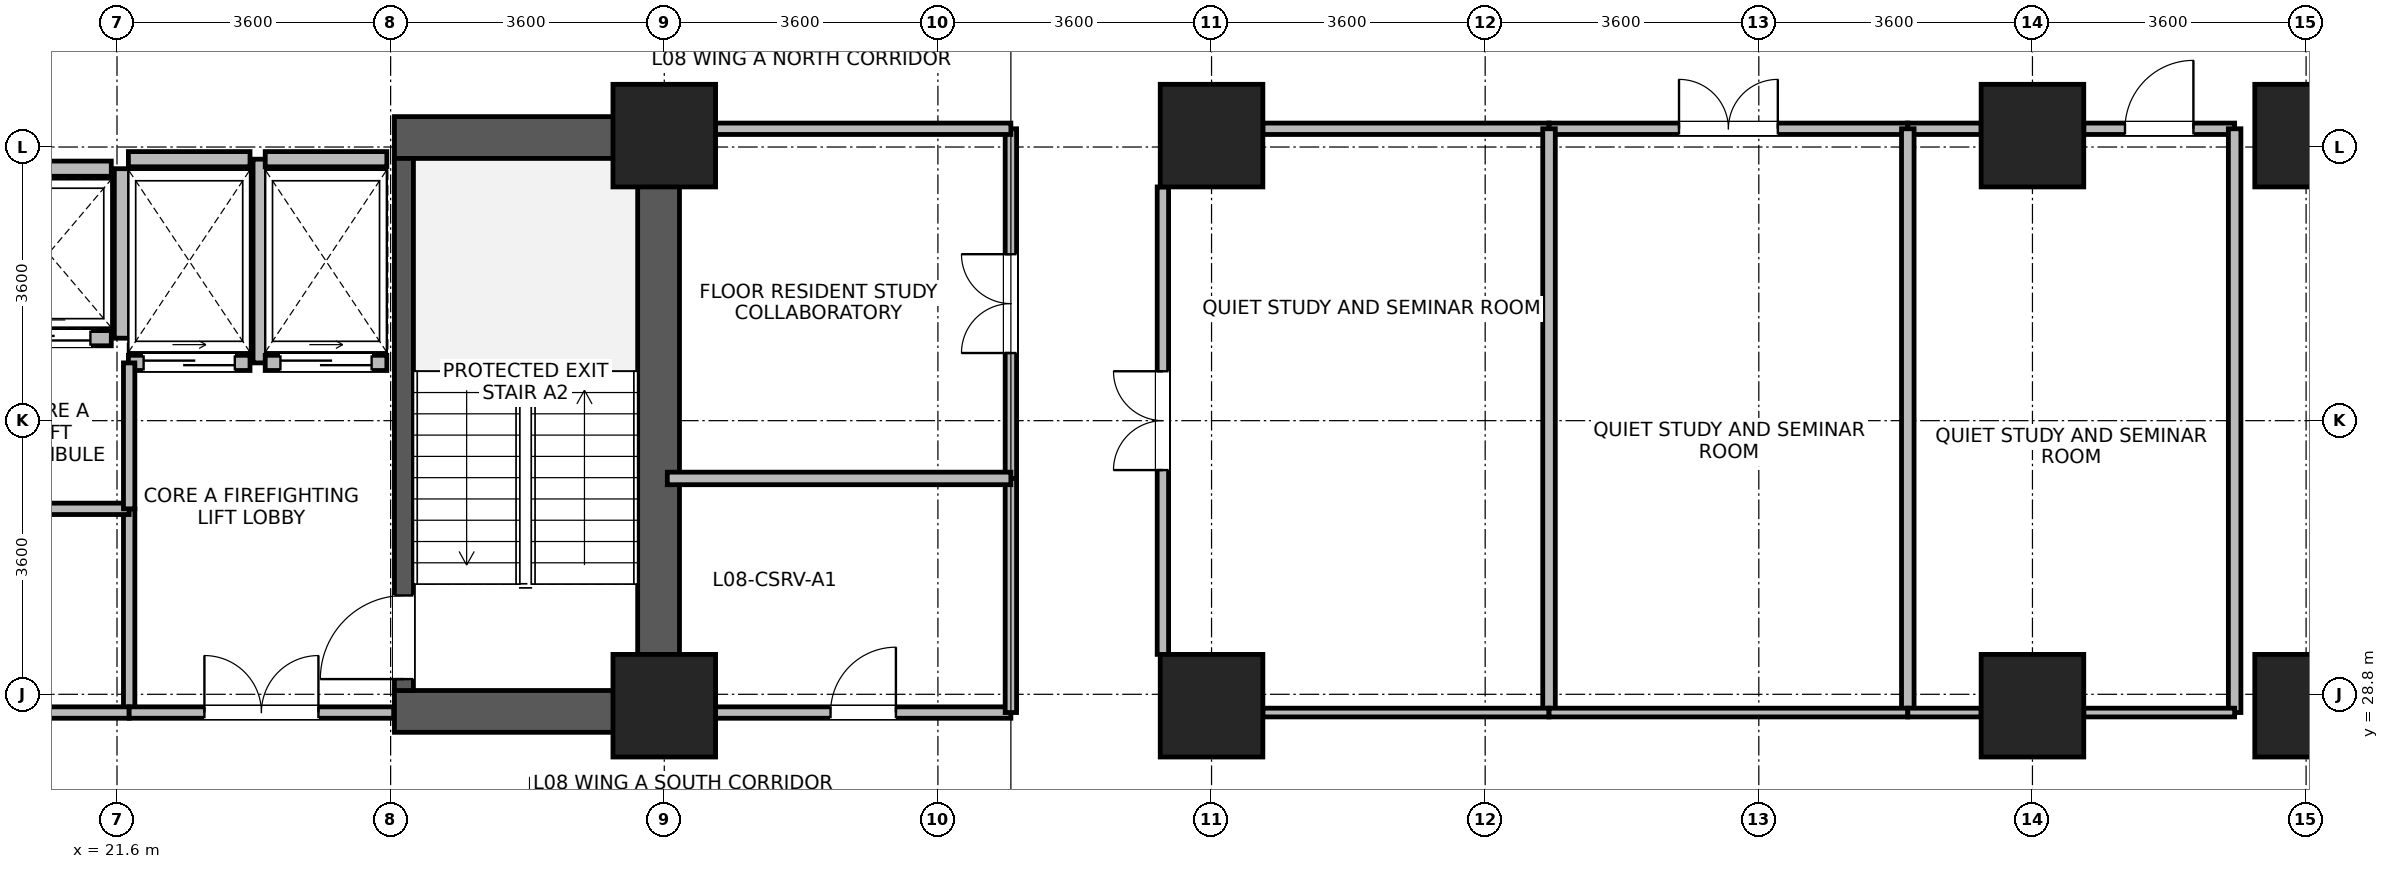
"""IFC4 building model, lengths in metres.
Left out: names, types, materials, properties, quantities, classifications, styles, units other than length and angle.
Written with IfcOpenShell. Run it as: python <this file> out.ifc"""

import sys

from ifc_helpers import new_model, si_unit, direction, frame, frame_2d, origin, origin_2d, place, context, subcontext, project, spatial, rectangle, extrude, source, transform, mapped, element, fill, save


model = new_model("IFC4")
c1 = context("Model", 3, precision=1e-05, world=origin(), true_north=direction((0.0, 1.0)))
c2 = subcontext(c1, "Body", "Model", "MODEL_VIEW")
j1 = project(units=[si_unit("LENGTHUNIT", "METRE"), si_unit("PLANEANGLEUNIT", "RADIAN")], contexts=[c1])
p1 = place(None, origin())
s1 = spatial("IfcSite", under=j1, at=p1, CompositionType="ELEMENT")
p2 = place(p1, origin())
s2 = spatial("IfcBuilding", under=s1, at=p2, CompositionType="ELEMENT")
p3 = place(p2, frame((0.0, 0.0, 36.4)))
s3 = spatial("IfcBuildingStorey", under=s2, at=p3, CompositionType="ELEMENT", Elevation=36.4)
p4 = place(p3, frame((28.725, 28.3, 0.0), z_axis=(0.0, 0.0, 1.0), x_axis=(0.0, 1.0, 0.0)))
e1 = element("IfcWall", 1, at=p4, inside=s3, PredefinedType="SHEAR", context=c2, shape_type="SweptSolid", body=[
    extrude(rectangle(XDim=8.1, YDim=0.55, at=frame_2d((4.05, 0.0))), origin(), (0.0, 0.0, 1.0), 3.45),
])
for number, where, z_axis, x_axis in (
    (2, (25.25, 28.575, 0.0), (0.0, 0.0, 1.0), (1.0, 0.0, 0.0)),
    (3, (25.25, 36.125, 0.0), (0.0, 0.0, 1.0), (1.0, 0.0, 0.0)),
):
    element("IfcWall", number, at=place(p3, frame(where, z_axis=z_axis, x_axis=x_axis)), inside=s3, PredefinedType="SHEAR", context=c2, shape_type="SweptSolid", body=[
        extrude(rectangle(XDim=3.2, YDim=0.55, at=frame_2d((1.6, 0.0))), origin(), (0.0, 0.0, 1.0), 3.45),
    ])
p5 = place(p3, frame((25.375, 28.85, 0.0), z_axis=(0.0, 0.0, 1.0), x_axis=(0.0, 1.0, 0.0)))
e4 = element("IfcWall", 4, at=p5, inside=s3, PredefinedType="SHEAR", context=c2, shape_type="SweptSolid", body=[
    extrude(rectangle(XDim=7.0, YDim=0.25, at=frame_2d((3.5, 0.0))), origin(), (0.0, 0.0, 1.0), 3.45),
])
p6 = place(p5, frame((0.15, 0.0, 0.0)))
e5 = element("IfcOpeningElement", 5, at=p6, cuts=e4, PredefinedType="OPENING", context=c2, shape_type="SweptSolid", body=[
    extrude(rectangle(XDim=1.1, YDim=2.08, at=frame_2d((0.55, 1.04))), frame((0.0, 0.135, 0.0), z_axis=(0.0, -1.0, 0.0), x_axis=(1.0, 0.0, 0.0)), (0.0, 0.0, 1.0), 0.27),
])
m1 = source(origin(), c2, "Body", "SweptSolid", [
    extrude(rectangle(XDim=1.35, YDim=1.35, at=origin_2d()), origin(), (0.0, 0.0, 1.0), 3.7),
])
for number, where, z_axis, x_axis in (
    (6, (28.8, 28.65, 0.0), (0.0, 0.0, 1.0), (1.0, 0.0, 0.0)),
    (7, (28.8, 36.15, 0.0), (0.0, 0.0, 1.0), (1.0, 0.0, 0.0)),
    (8, (36.0, 28.65, 0.0), (0.0, 0.0, 1.0), (1.0, 0.0, 0.0)),
    (9, (36.0, 36.15, 0.0), (0.0, 0.0, 1.0), (1.0, 0.0, 0.0)),
    (10, (46.8, 28.65, 0.0), (0.0, 0.0, 1.0), (1.0, 0.0, 0.0)),
    (11, (46.8, 36.15, 0.0), (0.0, 0.0, 1.0), (1.0, 0.0, 0.0)),
    (12, (50.4, 28.65, 0.0), (0.0, 0.0, 1.0), (1.0, 0.0, 0.0)),
    (13, (50.4, 36.15, 0.0), (0.0, 0.0, 1.0), (1.0, 0.0, 0.0)),
):
    element("IfcColumn", number, at=place(p3, frame(where, z_axis=z_axis, x_axis=x_axis)), inside=s3, PredefinedType="COLUMN", context=c2, shape_type="MappedRepresentation", body=[
        mapped(m1, transform((0.0, 0.0, 0.0), x_axis=(1.0, 0.0, 0.0), y_axis=(0.0, 1.0, 0.0), z_axis=(0.0, 0.0, 1.0), scale=1.0)),
    ])
p7 = place(p3, frame((19.875, 33.485, 0.0), z_axis=(0.0, 0.0, 1.0), x_axis=(1.0, 0.0, 0.0)))
e14 = element("IfcWall", 14, at=p7, inside=s3, PredefinedType="PARTITIONING", context=c2, shape_type="SweptSolid", body=[
    extrude(rectangle(XDim=1.65, YDim=0.2, at=frame_2d((0.825, 0.0))), origin(), (0.0, 0.0, 1.0), 3.43),
])
p8 = place(p7, frame((0.275, 0.0, 0.0)))
e15 = element("IfcOpeningElement", 15, at=p8, cuts=e14, PredefinedType="OPENING", context=c2, shape_type="SweptSolid", body=[
    extrude(rectangle(XDim=1.1, YDim=2.12, at=frame_2d((0.55, 1.06))), frame((0.0, 0.11, 0.0), z_axis=(0.0, -1.0, 0.0), x_axis=(1.0, 0.0, 0.0)), (0.0, 0.0, 1.0), 0.22),
])
p9 = place(p3, frame((19.875, 35.715, 0.0), z_axis=(0.0, 0.0, 1.0), x_axis=(1.0, 0.0, 0.0)))
e16 = element("IfcWall", 16, at=p9, inside=s3, PredefinedType="PARTITIONING", context=c2, shape_type="SweptSolid", body=[
    extrude(rectangle(XDim=1.65, YDim=0.2, at=frame_2d((0.825, 0.0))), origin(), (0.0, 0.0, 1.0), 2.23),
])
p10 = place(p3, frame((21.665, 33.485, 0.0), z_axis=(0.0, 0.0, 1.0), x_axis=(0.0, 1.0, 0.0)))
e17 = element("IfcWall", 17, at=p10, inside=s3, PredefinedType="PARTITIONING", context=c2, shape_type="SweptSolid", body=[
    extrude(rectangle(XDim=2.23, YDim=0.2, at=frame_2d((1.115, 0.0))), origin(), (0.0, 0.0, 1.0), 3.43),
])
p11 = place(p3, frame((21.75, 33.16, 0.0), z_axis=(0.0, 0.0, 1.0), x_axis=(1.0, 0.0, 0.0)))
e18 = element("IfcWall", 18, at=p11, inside=s3, PredefinedType="PARTITIONING", context=c2, shape_type="SweptSolid", body=[
    extrude(rectangle(XDim=1.6, YDim=0.2, at=frame_2d((0.8, 0.0))), origin(), (0.0, 0.0, 1.0), 3.43),
])
p12 = place(p11, frame((0.2, 0.0, 0.0)))
e19 = element("IfcOpeningElement", 19, at=p12, cuts=e18, PredefinedType="OPENING", context=c2, shape_type="SweptSolid", body=[
    extrude(rectangle(XDim=1.2, YDim=2.12, at=frame_2d((0.6, 1.06))), frame((0.0, 0.11, 0.0), z_axis=(0.0, -1.0, 0.0), x_axis=(1.0, 0.0, 0.0)), (0.0, 0.0, 1.0), 0.22),
])
p13 = place(p3, frame((21.75, 35.84, 0.0), z_axis=(0.0, 0.0, 1.0), x_axis=(1.0, 0.0, 0.0)))
e20 = element("IfcWall", 20, at=p13, inside=s3, PredefinedType="PARTITIONING", context=c2, shape_type="SweptSolid", body=[
    extrude(rectangle(XDim=1.6, YDim=0.2, at=frame_2d((0.8, 0.0))), origin(), (0.0, 0.0, 1.0), 2.23),
])
p14 = place(p3, frame((23.49, 33.16, 0.0), z_axis=(0.0, 0.0, 1.0), x_axis=(0.0, 1.0, 0.0)))
e21 = element("IfcWall", 21, at=p14, inside=s3, PredefinedType="PARTITIONING", context=c2, shape_type="SweptSolid", body=[
    extrude(rectangle(XDim=2.68, YDim=0.2, at=frame_2d((1.34, 0.0))), origin(), (0.0, 0.0, 1.0), 3.43),
])
p15 = place(p3, frame((23.55, 33.16, 0.0), z_axis=(0.0, 0.0, 1.0), x_axis=(1.0, 0.0, 0.0)))
e22 = element("IfcWall", 22, at=p15, inside=s3, PredefinedType="PARTITIONING", context=c2, shape_type="SweptSolid", body=[
    extrude(rectangle(XDim=1.6, YDim=0.2, at=frame_2d((0.8, 0.0))), origin(), (0.0, 0.0, 1.0), 3.43),
])
p16 = place(p15, frame((0.2, 0.0, 0.0)))
e23 = element("IfcOpeningElement", 23, at=p16, cuts=e22, PredefinedType="OPENING", context=c2, shape_type="SweptSolid", body=[
    extrude(rectangle(XDim=1.2, YDim=2.12, at=frame_2d((0.6, 1.06))), frame((0.0, 0.11, 0.0), z_axis=(0.0, -1.0, 0.0), x_axis=(1.0, 0.0, 0.0)), (0.0, 0.0, 1.0), 0.22),
])
p17 = place(p3, frame((23.55, 35.84, 0.0), z_axis=(0.0, 0.0, 1.0), x_axis=(1.0, 0.0, 0.0)))
e24 = element("IfcWall", 24, at=p17, inside=s3, PredefinedType="PARTITIONING", context=c2, shape_type="SweptSolid", body=[
    extrude(rectangle(XDim=1.6, YDim=0.2, at=frame_2d((0.8, 0.0))), origin(), (0.0, 0.0, 1.0), 2.23),
])
p18 = place(p3, frame((35.36, 29.325, 0.0), z_axis=(0.0, 0.0, 1.0), x_axis=(0.0, 1.0, 0.0)))
e25 = element("IfcWall", 25, at=p18, inside=s3, PredefinedType="PARTITIONING", context=c2, shape_type="SweptSolid", body=[
    extrude(rectangle(XDim=6.15, YDim=0.15, at=frame_2d((3.075, 0.0))), origin(), (0.0, 0.0, 1.0), 3.43),
])
p19 = place(p18, frame((2.425, 0.0, 0.0)))
e26 = element("IfcOpeningElement", 26, at=p19, cuts=e25, PredefinedType="OPENING", context=c2, shape_type="SweptSolid", body=[
    extrude(rectangle(XDim=1.3, YDim=2.12, at=frame_2d((0.65, 1.06))), frame((0.0, 0.085, 0.0), z_axis=(0.0, -1.0, 0.0), x_axis=(1.0, 0.0, 0.0)), (0.0, 0.0, 1.0), 0.17),
])
p20 = place(p3, frame((36.675, 36.24, 0.0), z_axis=(0.0, 0.0, 1.0), x_axis=(1.0, 0.0, 0.0)))
e27 = element("IfcWall", 27, at=p20, inside=s3, PredefinedType="PARTITIONING", context=c2, shape_type="SweptSolid", body=[
    extrude(rectangle(XDim=3.765, YDim=0.15, at=frame_2d((1.882, 0.0))), origin(), (0.0, 0.0, 1.0), 2.78),
])
p21 = place(p3, frame((40.44, 36.24, 0.0), z_axis=(0.0, 0.0, 1.0), x_axis=(1.0, 0.0, 0.0)))
e28 = element("IfcWall", 28, at=p21, inside=s3, PredefinedType="PARTITIONING", context=c2, shape_type="SweptSolid", body=[
    extrude(rectangle(XDim=4.72, YDim=0.15, at=frame_2d((2.36, 0.0))), origin(), (0.0, 0.0, 1.0), 2.78),
])
p22 = place(p21, frame((1.71, 0.0, 0.0)))
e29 = element("IfcOpeningElement", 29, at=p22, cuts=e28, PredefinedType="OPENING", context=c2, shape_type="SweptSolid", body=[
    extrude(rectangle(XDim=1.3, YDim=2.12, at=frame_2d((0.65, 1.06))), frame((0.0, 0.085, 0.0), z_axis=(0.0, -1.0, 0.0), x_axis=(1.0, 0.0, 0.0)), (0.0, 0.0, 1.0), 0.17),
])
p23 = place(p3, frame((33.36, 31.64, 0.0), z_axis=(0.0, 0.0, 1.0), x_axis=(0.0, 1.0, 0.0)))
e30 = element("IfcWall", 30, at=p23, inside=s3, PredefinedType="PARTITIONING", context=c2, shape_type="SweptSolid", body=[
    extrude(rectangle(XDim=4.6, YDim=0.15, at=frame_2d((2.3, 0.0))), origin(), (0.0, 0.0, 1.0), 3.43),
])
p24 = place(p23, frame((1.65, 0.0, 0.0)))
e31 = element("IfcOpeningElement", 31, at=p24, cuts=e30, PredefinedType="OPENING", context=c2, shape_type="SweptSolid", body=[
    extrude(rectangle(XDim=1.3, YDim=2.12, at=frame_2d((0.65, 1.06))), frame((0.0, 0.085, 0.0), z_axis=(0.0, -1.0, 0.0), x_axis=(1.0, 0.0, 0.0)), (0.0, 0.0, 1.0), 0.17),
])
p25 = place(p3, frame((29.475, 28.56, 0.0), z_axis=(0.0, 0.0, 1.0), x_axis=(1.0, 0.0, 0.0)))
e32 = element("IfcWall", 32, at=p25, inside=s3, PredefinedType="PARTITIONING", context=c2, shape_type="SweptSolid", body=[
    extrude(rectangle(XDim=3.885, YDim=0.15, at=frame_2d((1.942, 0.0))), origin(), (0.0, 0.0, 1.0), 2.78),
])
p26 = place(p25, frame((1.512, 0.0, 0.0)))
e33 = element("IfcOpeningElement", 33, at=p26, cuts=e32, PredefinedType="OPENING", context=c2, shape_type="SweptSolid", body=[
    extrude(rectangle(XDim=0.86, YDim=2.02, at=frame_2d((0.43, 1.01))), frame((0.0, 0.085, 0.0), z_axis=(0.0, -1.0, 0.0), x_axis=(1.0, 0.0, 0.0)), (0.0, 0.0, 1.0), 0.17),
])
p27 = place(p3, frame((29.475, 36.24, 0.0), z_axis=(0.0, 0.0, 1.0), x_axis=(1.0, 0.0, 0.0)))
e34 = element("IfcWall", 34, at=p27, inside=s3, PredefinedType="PARTITIONING", context=c2, shape_type="SweptSolid", body=[
    extrude(rectangle(XDim=3.885, YDim=0.15, at=frame_2d((1.942, 0.0))), origin(), (0.0, 0.0, 1.0), 2.78),
])
p28 = place(p3, frame((45.16, 36.24, 0.0), z_axis=(0.0, 0.0, 1.0), x_axis=(1.0, 0.0, 0.0)))
e35 = element("IfcWall", 35, at=p28, inside=s3, PredefinedType="PARTITIONING", context=c2, shape_type="SweptSolid", body=[
    extrude(rectangle(XDim=0.965, YDim=0.15, at=frame_2d((0.482, 0.0))), origin(), (0.0, 0.0, 1.0), 2.78),
])
p29 = place(p3, frame((47.475, 36.24, 0.0), z_axis=(0.0, 0.0, 1.0), x_axis=(1.0, 0.0, 0.0)))
e36 = element("IfcWall", 36, at=p29, inside=s3, PredefinedType="PARTITIONING", context=c2, shape_type="SweptSolid", body=[
    extrude(rectangle(XDim=1.985, YDim=0.15, at=frame_2d((0.992, 0.0))), origin(), (0.0, 0.0, 1.0), 2.78),
])
p30 = place(p29, frame((0.542, 0.0, 0.0)))
e37 = element("IfcOpeningElement", 37, at=p30, cuts=e36, PredefinedType="OPENING", context=c2, shape_type="SweptSolid", body=[
    extrude(rectangle(XDim=0.9, YDim=2.08, at=frame_2d((0.45, 1.04))), frame((0.0, 0.085, 0.0), z_axis=(0.0, -1.0, 0.0), x_axis=(1.0, 0.0, 0.0)), (0.0, 0.0, 1.0), 0.17),
])
p31 = place(p3, frame((33.36, 28.56, 0.0), z_axis=(0.0, 0.0, 1.0), x_axis=(0.0, 1.0, 0.0)))
e38 = element("IfcWall", 38, at=p31, inside=s3, PredefinedType="PARTITIONING", context=c2, shape_type="SweptSolid", body=[
    extrude(rectangle(XDim=3.08, YDim=0.15, at=frame_2d((1.54, 0.0))), origin(), (0.0, 0.0, 1.0), 3.43),
])
p32 = place(p3, frame((21.76, 28.56, 0.0), z_axis=(0.0, 0.0, 1.0), x_axis=(0.0, 1.0, 0.0)))
e39 = element("IfcWall", 39, at=p32, inside=s3, PredefinedType="PARTITIONING", context=c2, shape_type="SweptSolid", body=[
    extrude(rectangle(XDim=2.68, YDim=0.15, at=frame_2d((1.34, 0.0))), origin(), (0.0, 0.0, 1.0), 3.43),
])
p33 = place(p3, frame((19.76, 28.56, 0.0), z_axis=(0.0, 0.0, 1.0), x_axis=(1.0, 0.0, 0.0)))
e40 = element("IfcWall", 40, at=p33, inside=s3, PredefinedType="PARTITIONING", context=c2, shape_type="SweptSolid", body=[
    extrude(rectangle(XDim=2.0, YDim=0.15, at=frame_2d((1.0, 0.0))), origin(), (0.0, 0.0, 1.0), 2.23),
])
p34 = place(p3, frame((19.76, 31.24, 0.0), z_axis=(0.0, 0.0, 1.0), x_axis=(1.0, 0.0, 0.0)))
e41 = element("IfcWall", 41, at=p34, inside=s3, PredefinedType="PARTITIONING", context=c2, shape_type="SweptSolid", body=[
    extrude(rectangle(XDim=2.0, YDim=0.15, at=frame_2d((1.0, 0.0))), origin(), (0.0, 0.0, 1.0), 3.43),
])
for number, where, z_axis, x_axis in (
    (42, (40.44, 28.56, 0.0), (0.0, 0.0, 1.0), (0.0, 1.0, 0.0)),
    (43, (45.16, 28.56, 0.0), (0.0, 0.0, 1.0), (0.0, 1.0, 0.0)),
    (44, (49.46, 28.56, 0.0), (0.0, 0.0, 1.0), (0.0, 1.0, 0.0)),
):
    element("IfcWall", number, at=place(p3, frame(where, z_axis=z_axis, x_axis=x_axis)), inside=s3, PredefinedType="PARTITIONING", context=c2, shape_type="SweptSolid", body=[
        extrude(rectangle(XDim=7.68, YDim=0.165, at=frame_2d((3.84, 0.0))), origin(), (0.0, 0.0, 1.0), 3.43),
    ])
p35 = place(p3, frame((36.675, 28.56, 0.0), z_axis=(0.0, 0.0, 1.0), x_axis=(1.0, 0.0, 0.0)))
e45 = element("IfcWall", 45, at=p35, inside=s3, PredefinedType="PARTITIONING", context=c2, shape_type="SweptSolid", body=[
    extrude(rectangle(XDim=3.765, YDim=0.115, at=frame_2d((1.882, 0.0))), origin(), (0.0, 0.0, 1.0), 2.78),
])
p36 = place(p3, frame((40.44, 28.56, 0.0), z_axis=(0.0, 0.0, 1.0), x_axis=(1.0, 0.0, 0.0)))
e46 = element("IfcWall", 46, at=p36, inside=s3, PredefinedType="PARTITIONING", context=c2, shape_type="SweptSolid", body=[
    extrude(rectangle(XDim=4.72, YDim=0.115, at=frame_2d((2.36, 0.0))), origin(), (0.0, 0.0, 1.0), 2.78),
])
p37 = place(p3, frame((28.84, 31.64, 0.0), z_axis=(0.0, 0.0, 1.0), x_axis=(1.0, 0.0, 0.0)))
e47 = element("IfcWall", 47, at=p37, inside=s3, PredefinedType="PARTITIONING", context=c2, shape_type="SweptSolid", body=[
    extrude(rectangle(XDim=4.52, YDim=0.165, at=frame_2d((2.26, 0.0))), origin(), (0.0, 0.0, 1.0), 3.43),
])
p38 = place(p3, frame((45.16, 28.56, 0.0), z_axis=(0.0, 0.0, 1.0), x_axis=(1.0, 0.0, 0.0)))
e48 = element("IfcWall", 48, at=p38, inside=s3, PredefinedType="PARTITIONING", context=c2, shape_type="SweptSolid", body=[
    extrude(rectangle(XDim=0.965, YDim=0.115, at=frame_2d((0.482, 0.0))), origin(), (0.0, 0.0, 1.0), 2.78),
])
p39 = place(p3, frame((47.475, 28.56, 0.0), z_axis=(0.0, 0.0, 1.0), x_axis=(1.0, 0.0, 0.0)))
e49 = element("IfcWall", 49, at=p39, inside=s3, PredefinedType="PARTITIONING", context=c2, shape_type="SweptSolid", body=[
    extrude(rectangle(XDim=1.985, YDim=0.115, at=frame_2d((0.992, 0.0))), origin(), (0.0, 0.0, 1.0), 2.78),
])
p40 = place(p3, frame((21.76, 28.56, 0.0), z_axis=(0.0, 0.0, 1.0), x_axis=(1.0, 0.0, 0.0)))
e50 = element("IfcWall", 50, at=p40, inside=s3, PredefinedType="PARTITIONING", context=c2, shape_type="SweptSolid", body=[
    extrude(rectangle(XDim=3.48, YDim=0.15, at=frame_2d((1.74, 0.0))), origin(), (0.0, 0.0, 1.0), 2.23),
])
p41 = place(p40, frame((0.99, 0.0, 0.0)))
e51 = element("IfcOpeningElement", 51, at=p41, cuts=e50, PredefinedType="OPENING", context=c2, shape_type="SweptSolid", body=[
    extrude(rectangle(XDim=1.5, YDim=2.1, at=frame_2d((0.75, 1.05))), frame((0.0, 0.085, 0.0), z_axis=(0.0, -1.0, 0.0), x_axis=(1.0, 0.0, 0.0)), (0.0, 0.0, 1.0), 0.17),
])
p42 = place(p3, frame((21.76, 31.24, 0.0), z_axis=(0.0, 0.0, 1.0), x_axis=(0.0, 1.0, 0.0)))
e52 = element("IfcWall", 52, at=p42, inside=s3, PredefinedType="PARTITIONING", context=c2, shape_type="SweptSolid", body=[
    extrude(rectangle(XDim=1.92, YDim=0.15, at=frame_2d((0.96, 0.0))), origin(), (0.0, 0.0, 1.0), 3.43),
])
p43 = place(p6, origin())
e53 = element("IfcDoor", 53, at=p43, inside=s3, OperationType="SINGLE_SWING_LEFT", PredefinedType="DOOR", context=c2, shape_type="SweptSolid", body=[
    extrude(rectangle(XDim=1.1, YDim=2.08, at=frame_2d((0.55, 1.04))), frame((0.0, 0.025, 0.0), z_axis=(0.0, -1.0, 0.0), x_axis=(1.0, 0.0, 0.0)), (0.0, 0.0, 1.0), 0.05),
])
fill(e5, e53)
p44 = place(p8, origin())
e54 = element("IfcDoor", 54, at=p44, inside=s3, OperationType="SLIDING_TO_LEFT", PredefinedType="DOOR", context=c2, shape_type="SweptSolid", body=[
    extrude(rectangle(XDim=1.1, YDim=2.12, at=frame_2d((0.55, 1.06))), frame((0.0, 0.025, 0.0), z_axis=(0.0, -1.0, 0.0), x_axis=(1.0, 0.0, 0.0)), (0.0, 0.0, 1.0), 0.05),
])
fill(e15, e54)
p45 = place(p12, origin())
e55 = element("IfcDoor", 55, at=p45, inside=s3, OperationType="SLIDING_TO_RIGHT", PredefinedType="DOOR", context=c2, shape_type="SweptSolid", body=[
    extrude(rectangle(XDim=1.2, YDim=2.12, at=frame_2d((0.6, 1.06))), frame((0.0, 0.025, 0.0), z_axis=(0.0, -1.0, 0.0), x_axis=(1.0, 0.0, 0.0)), (0.0, 0.0, 1.0), 0.05),
])
fill(e19, e55)
p46 = place(p16, origin())
e56 = element("IfcDoor", 56, at=p46, inside=s3, OperationType="SLIDING_TO_RIGHT", PredefinedType="DOOR", context=c2, shape_type="SweptSolid", body=[
    extrude(rectangle(XDim=1.2, YDim=2.12, at=frame_2d((0.6, 1.06))), frame((0.0, 0.025, 0.0), z_axis=(0.0, -1.0, 0.0), x_axis=(1.0, 0.0, 0.0)), (0.0, 0.0, 1.0), 0.05),
])
fill(e23, e56)
p47 = place(p19, origin())
e57 = element("IfcDoor", 57, at=p47, inside=s3, OperationType="DOUBLE_DOOR_SINGLE_SWING", PredefinedType="DOOR", context=c2, shape_type="SweptSolid", body=[
    extrude(rectangle(XDim=1.3, YDim=2.12, at=frame_2d((0.65, 1.06))), frame((0.0, 0.025, 0.0), z_axis=(0.0, -1.0, 0.0), x_axis=(1.0, 0.0, 0.0)), (0.0, 0.0, 1.0), 0.05),
])
fill(e26, e57)
p48 = place(p22, origin())
e58 = element("IfcDoor", 58, at=p48, inside=s3, OperationType="DOUBLE_DOOR_SINGLE_SWING", PredefinedType="DOOR", context=c2, shape_type="SweptSolid", body=[
    extrude(rectangle(XDim=1.3, YDim=2.12, at=frame_2d((0.65, 1.06))), frame((0.0, 0.025, 0.0), z_axis=(0.0, -1.0, 0.0), x_axis=(1.0, 0.0, 0.0)), (0.0, 0.0, 1.0), 0.05),
])
fill(e29, e58)
p49 = place(p24, origin())
e59 = element("IfcDoor", 59, at=p49, inside=s3, OperationType="DOUBLE_DOOR_SINGLE_SWING", PredefinedType="DOOR", context=c2, shape_type="SweptSolid", body=[
    extrude(rectangle(XDim=1.3, YDim=2.12, at=frame_2d((0.65, 1.06))), frame((0.0, 0.025, 0.0), z_axis=(0.0, -1.0, 0.0), x_axis=(1.0, 0.0, 0.0)), (0.0, 0.0, 1.0), 0.05),
])
fill(e31, e59)
p50 = place(p26, origin())
e60 = element("IfcDoor", 60, at=p50, inside=s3, OperationType="SINGLE_SWING_RIGHT", PredefinedType="DOOR", context=c2, shape_type="SweptSolid", body=[
    extrude(rectangle(XDim=0.86, YDim=2.02, at=frame_2d((0.43, 1.01))), frame((0.0, 0.025, 0.0), z_axis=(0.0, -1.0, 0.0), x_axis=(1.0, 0.0, 0.0)), (0.0, 0.0, 1.0), 0.05),
])
fill(e33, e60)
p51 = place(p30, origin())
e61 = element("IfcDoor", 61, at=p51, inside=s3, OperationType="SINGLE_SWING_RIGHT", PredefinedType="DOOR", context=c2, shape_type="SweptSolid", body=[
    extrude(rectangle(XDim=0.9, YDim=2.08, at=frame_2d((0.45, 1.04))), frame((0.0, 0.025, 0.0), z_axis=(0.0, -1.0, 0.0), x_axis=(1.0, 0.0, 0.0)), (0.0, 0.0, 1.0), 0.05),
])
fill(e37, e61)
p52 = place(p41, origin())
e62 = element("IfcDoor", 62, at=p52, inside=s3, OperationType="DOUBLE_DOOR_SINGLE_SWING", PredefinedType="DOOR", context=c2, shape_type="SweptSolid", body=[
    extrude(rectangle(XDim=1.5, YDim=2.1, at=frame_2d((0.75, 1.05))), frame((0.0, 0.025, 0.0), z_axis=(0.0, -1.0, 0.0), x_axis=(1.0, 0.0, 0.0)), (0.0, 0.0, 1.0), 0.05),
])
fill(e51, e62)
save(model, sys.argv[1])
